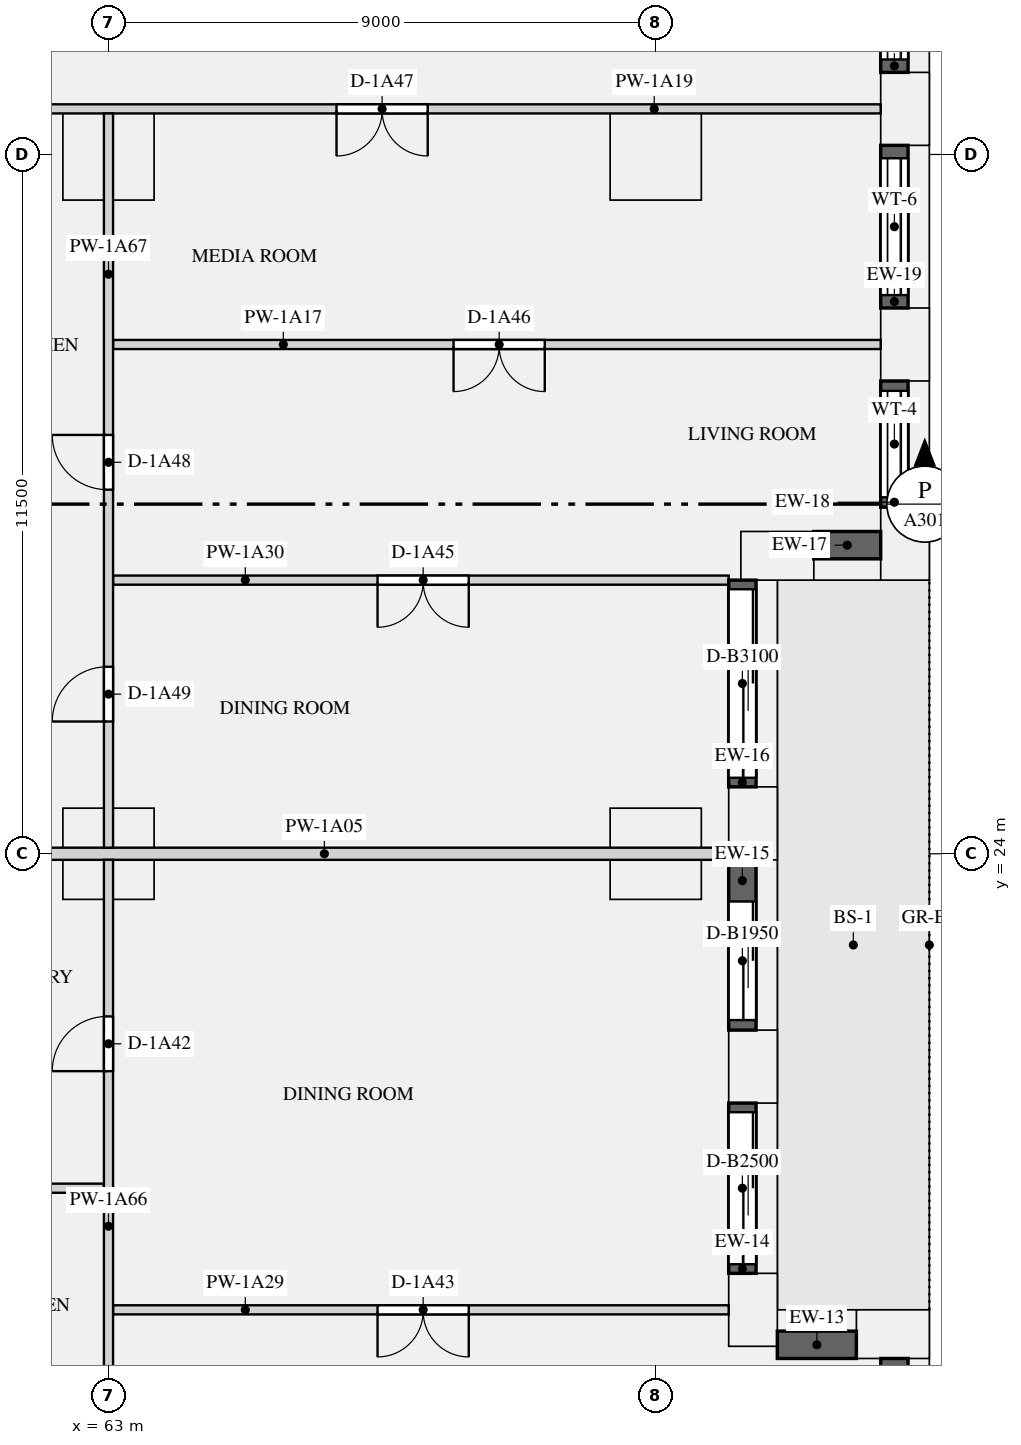
"""IFC4 building model, lengths in metres.
Left out: names, types, materials, properties, quantities, classifications, styles, units other than length and angle.
Written with IfcOpenShell. Run it as: python <this file> out.ifc"""

import sys

from ifc_helpers import new_model, si_unit, direction, frame, frame_2d, origin, origin_2d, place, context, subcontext, project, spatial, rectangle, extrude, element, fill, save


model = new_model("IFC4")
c1 = context("Model", 3, precision=1e-05, world=origin(), true_north=direction((0.0, 1.0)))
c2 = subcontext(c1, "Body", "Model", "MODEL_VIEW")
j1 = project(units=[si_unit("LENGTHUNIT", "METRE"), si_unit("PLANEANGLEUNIT", "RADIAN")], contexts=[c1])
p1 = place(None, origin())
s1 = spatial("IfcSite", under=j1, at=p1, CompositionType="ELEMENT")
p2 = place(p1, origin())
s2 = spatial("IfcBuilding", under=s1, at=p2, CompositionType="ELEMENT")
p3 = place(p2, frame((0.0, 0.0, 19.5)))
s3 = spatial("IfcBuildingStorey", under=s2, at=p3, CompositionType="ELEMENT", Elevation=19.5)
for number, where, z_axis, x_axis in (
    (1, (75.9, 16.1, 0.0), (0.0, 0.0, 1.0), (-1.0, 0.0, 0.0)),
    (2, (73.6, 16.5, 0.0), (0.0, 0.0, 1.0), (0.0, 1.0, 0.0)),
):
    element("IfcColumn", number, at=place(p3, frame(where, z_axis=z_axis, x_axis=x_axis)), inside=s3, PredefinedType="USERDEFINED", context=c2, shape_type="SweptSolid", body=[
        extrude(rectangle(XDim=1.2, YDim=0.8, at=origin_2d()), origin(), (0.0, 0.0, 1.0), 3.15),
    ])
for number, where, z_axis, x_axis in (
    (3, (73.6, 20.5, -0.32), (0.0, 0.0, 1.0), (0.0, 1.0, 0.0)),
    (4, (73.6, 24.5, -0.32), (0.0, 0.0, 1.0), (0.0, 1.0, 0.0)),
):
    element("IfcColumn", number, at=place(p3, frame(where, z_axis=z_axis, x_axis=x_axis)), inside=s3, PredefinedType="USERDEFINED", context=c2, shape_type="SweptSolid", body=[
        extrude(rectangle(XDim=1.2, YDim=0.8, at=origin_2d()), origin(), (0.0, 0.0, 1.0), 3.47),
    ])
for number, where, z_axis, x_axis in (
    (5, (74.0, 28.9, 0.0), (0.0, 0.0, 1.0), (1.0, 0.0, 0.0)),
    (6, (76.1, 29.1, 0.0), (0.0, 0.0, 1.0), (0.0, 1.0, 0.0)),
):
    element("IfcColumn", number, at=place(p3, frame(where, z_axis=z_axis, x_axis=x_axis)), inside=s3, PredefinedType="USERDEFINED", context=c2, shape_type="SweptSolid", body=[
        extrude(rectangle(XDim=1.2, YDim=0.8, at=origin_2d()), origin(), (0.0, 0.0, 1.0), 3.15),
    ])
for number, where, z_axis, x_axis in (
    (7, (76.1, 32.375, -0.32), (0.0, 0.0, 1.0), (0.0, 1.0, 0.0)),
    (8, (76.1, 36.25, -0.32), (0.0, 0.0, 1.0), (0.0, 1.0, 0.0)),
):
    element("IfcColumn", number, at=place(p3, frame(where, z_axis=z_axis, x_axis=x_axis)), inside=s3, PredefinedType="USERDEFINED", context=c2, shape_type="SweptSolid", body=[
        extrude(rectangle(XDim=1.2, YDim=0.8, at=origin_2d()), origin(), (0.0, 0.0, 1.0), 3.47),
    ])
for number, where, z_axis, x_axis in (
    (9, (63.0, 24.0, 0.0), (0.0, 0.0, 1.0), (1.0, 0.0, 0.0)),
    (10, (72.0, 24.0, 0.0), (0.0, 0.0, 1.0), (1.0, 0.0, 0.0)),
    (11, (63.0, 35.5, 0.0), (0.0, 0.0, 1.0), (1.0, 0.0, 0.0)),
    (12, (72.0, 35.5, 0.0), (0.0, 0.0, 1.0), (1.0, 0.0, 0.0)),
):
    element("IfcColumn", number, at=place(p3, frame(where, z_axis=z_axis, x_axis=x_axis)), inside=s3, PredefinedType="COLUMN", context=c2, shape_type="SweptSolid", body=[
        extrude(rectangle(XDim=1.5, YDim=1.5, at=origin_2d()), origin(), (0.0, 0.0, 1.0), 3.15),
    ])
p4 = place(p3, frame((75.925, 13.1, 0.9), z_axis=(0.0, 0.0, 1.0), x_axis=(0.0, 1.0, 0.0)))
e13 = element("IfcWall", 13, at=p4, inside=s3, PredefinedType="SOLIDWALL", context=c2, shape_type="SweptSolid", body=[
    extrude(rectangle(XDim=2.6, YDim=0.45, at=frame_2d((1.3, 0.0))), origin(), (0.0, 0.0, 1.0), 1.93),
])
p5 = place(p4, frame((0.175, 0.0, 0.15)))
e14 = element("IfcOpeningElement", 14, at=p5, cuts=e13, PredefinedType="OPENING", context=c2, shape_type="SweptSolid", body=[
    extrude(rectangle(XDim=2.25, YDim=1.5, at=frame_2d((1.125, 0.75))), frame((0.0, 0.235, 0.0), z_axis=(0.0, -1.0, 0.0), x_axis=(1.0, 0.0, 0.0)), (0.0, 0.0, 1.0), 0.47),
])
p6 = place(p3, frame((75.3, 15.925, 0.9), z_axis=(0.0, 0.0, 1.0), x_axis=(-1.0, 0.0, 0.0)))
e15 = element("IfcWall", 15, at=p6, inside=s3, PredefinedType="SOLIDWALL", context=c2, shape_type="SweptSolid", body=[
    extrude(rectangle(XDim=1.3, YDim=0.45, at=frame_2d((0.65, 0.0))), origin(), (0.0, 0.0, 1.0), 1.93),
])
p7 = place(p3, frame((73.425, 17.1, 0.0), z_axis=(0.0, 0.0, 1.0), x_axis=(0.0, 1.0, 0.0)))
e16 = element("IfcWall", 16, at=p7, inside=s3, PredefinedType="SOLIDWALL", context=c2, shape_type="SweptSolid", body=[
    extrude(rectangle(XDim=2.8, YDim=0.45, at=frame_2d((1.4, 0.0))), origin(), (0.0, 0.0, 1.0), 2.83),
])
p8 = place(p7, frame((0.15, 0.0, 0.0)))
e17 = element("IfcOpeningElement", 17, at=p8, cuts=e16, PredefinedType="OPENING", context=c2, shape_type="SweptSolid", body=[
    extrude(rectangle(XDim=2.5, YDim=2.3, at=frame_2d((1.25, 1.15))), frame((0.0, 0.235, 0.0), z_axis=(0.0, -1.0, 0.0), x_axis=(1.0, 0.0, 0.0)), (0.0, 0.0, 1.0), 0.47),
])
p9 = place(p3, frame((73.425, 21.1, 0.0), z_axis=(0.0, 0.0, 1.0), x_axis=(0.0, 1.0, 0.0)))
e18 = element("IfcWall", 18, at=p9, inside=s3, PredefinedType="SOLIDWALL", context=c2, shape_type="SweptSolid", body=[
    extrude(rectangle(XDim=2.8, YDim=0.45, at=frame_2d((1.4, 0.0))), origin(), (0.0, 0.0, 1.0), 2.83),
])
p10 = place(p9, frame((0.165, 0.0, 0.0)))
e19 = element("IfcOpeningElement", 19, at=p10, cuts=e18, PredefinedType="OPENING", context=c2, shape_type="SweptSolid", body=[
    extrude(rectangle(XDim=1.95, YDim=2.3, at=frame_2d((0.975, 1.15))), frame((0.0, 0.235, 0.0), z_axis=(0.0, -1.0, 0.0), x_axis=(1.0, 0.0, 0.0)), (0.0, 0.0, 1.0), 0.47),
])
p11 = place(p3, frame((73.425, 25.1, 0.0), z_axis=(0.0, 0.0, 1.0), x_axis=(0.0, 1.0, 0.0)))
e20 = element("IfcWall", 20, at=p11, inside=s3, PredefinedType="SOLIDWALL", context=c2, shape_type="SweptSolid", body=[
    extrude(rectangle(XDim=3.4, YDim=0.45, at=frame_2d((1.7, 0.0))), origin(), (0.0, 0.0, 1.0), 2.83),
])
p12 = place(p11, frame((0.15, 0.0, 0.0)))
e21 = element("IfcOpeningElement", 21, at=p12, cuts=e20, PredefinedType="OPENING", context=c2, shape_type="SweptSolid", body=[
    extrude(rectangle(XDim=3.1, YDim=2.3, at=frame_2d((1.55, 1.15))), frame((0.0, 0.235, 0.0), z_axis=(0.0, -1.0, 0.0), x_axis=(1.0, 0.0, 0.0)), (0.0, 0.0, 1.0), 0.47),
])
p13 = place(p3, frame((74.6, 29.075, 0.9), z_axis=(0.0, 0.0, 1.0), x_axis=(1.0, 0.0, 0.0)))
e22 = element("IfcWall", 22, at=p13, inside=s3, PredefinedType="SOLIDWALL", context=c2, shape_type="SweptSolid", body=[
    extrude(rectangle(XDim=1.1, YDim=0.45, at=frame_2d((0.55, 0.0))), origin(), (0.0, 0.0, 1.0), 1.93),
])
p14 = place(p3, frame((75.925, 29.7, 0.9), z_axis=(0.0, 0.0, 1.0), x_axis=(0.0, 1.0, 0.0)))
e23 = element("IfcWall", 23, at=p14, inside=s3, PredefinedType="SOLIDWALL", context=c2, shape_type="SweptSolid", body=[
    extrude(rectangle(XDim=2.075, YDim=0.45, at=frame_2d((1.038, 0.0))), origin(), (0.0, 0.0, 1.0), 1.93),
])
p15 = place(p14, frame((0.163, 0.0, 0.15)))
e24 = element("IfcOpeningElement", 24, at=p15, cuts=e23, PredefinedType="OPENING", context=c2, shape_type="SweptSolid", body=[
    extrude(rectangle(XDim=1.75, YDim=1.5, at=frame_2d((0.875, 0.75))), frame((0.0, 0.235, 0.0), z_axis=(0.0, -1.0, 0.0), x_axis=(1.0, 0.0, 0.0)), (0.0, 0.0, 1.0), 0.47),
])
p16 = place(p3, frame((75.925, 32.975, 0.9), z_axis=(0.0, 0.0, 1.0), x_axis=(0.0, 1.0, 0.0)))
e25 = element("IfcWall", 25, at=p16, inside=s3, PredefinedType="SOLIDWALL", context=c2, shape_type="SweptSolid", body=[
    extrude(rectangle(XDim=2.675, YDim=0.45, at=frame_2d((1.337, 0.0))), origin(), (0.0, 0.0, 1.0), 1.93),
])
p17 = place(p16, frame((0.212, 0.0, 0.15)))
e26 = element("IfcOpeningElement", 26, at=p17, cuts=e25, PredefinedType="OPENING", context=c2, shape_type="SweptSolid", body=[
    extrude(rectangle(XDim=2.25, YDim=1.5, at=frame_2d((1.125, 0.75))), frame((0.0, 0.235, 0.0), z_axis=(0.0, -1.0, 0.0), x_axis=(1.0, 0.0, 0.0)), (0.0, 0.0, 1.0), 0.47),
])
p18 = place(p3, frame((75.925, 36.85, 0.9), z_axis=(0.0, 0.0, 1.0), x_axis=(0.0, 1.0, 0.0)))
e27 = element("IfcWall", 27, at=p18, inside=s3, PredefinedType="SOLIDWALL", context=c2, shape_type="SweptSolid", body=[
    extrude(rectangle(XDim=2.675, YDim=0.45, at=frame_2d((1.337, 0.0))), origin(), (0.0, 0.0, 1.0), 1.93),
])
p19 = place(p18, frame((0.212, 0.0, 0.15)))
e28 = element("IfcOpeningElement", 28, at=p19, cuts=e27, PredefinedType="OPENING", context=c2, shape_type="SweptSolid", body=[
    extrude(rectangle(XDim=2.25, YDim=1.5, at=frame_2d((1.125, 0.75))), frame((0.0, 0.235, 0.0), z_axis=(0.0, -1.0, 0.0), x_axis=(1.0, 0.0, 0.0)), (0.0, 0.0, 1.0), 0.47),
])
p20 = place(p3, frame((59.9, 24.0, 0.0), z_axis=(0.0, 0.0, 1.0), x_axis=(1.0, 0.0, 0.0)))
e29 = element("IfcWall", 29, at=p20, inside=s3, PredefinedType="PARTITIONING", context=c2, shape_type="SweptSolid", body=[
    extrude(rectangle(XDim=13.3, YDim=0.2, at=frame_2d((6.65, 0.0))), origin(), (0.0, 0.0, 1.0), 2.83),
])
p21 = place(p3, frame((63.075, 32.375, 0.0), z_axis=(0.0, 0.0, 1.0), x_axis=(1.0, 0.0, 0.0)))
e30 = element("IfcWall", 30, at=p21, inside=s3, PredefinedType="PARTITIONING", context=c2, shape_type="SweptSolid", body=[
    extrude(rectangle(XDim=12.625, YDim=0.15, at=frame_2d((6.312, 0.0))), origin(), (0.0, 0.0, 1.0), 2.83),
])
p22 = place(p21, frame((5.6, 0.0, 0.0)))
e31 = element("IfcOpeningElement", 31, at=p22, cuts=e30, PredefinedType="OPENING", context=c2, shape_type="SweptSolid", body=[
    extrude(rectangle(XDim=1.5, YDim=2.1, at=frame_2d((0.75, 1.05))), frame((0.0, 0.085, 0.0), z_axis=(0.0, -1.0, 0.0), x_axis=(1.0, 0.0, 0.0)), (0.0, 0.0, 1.0), 0.17),
])
p23 = place(p3, frame((59.725, 36.25, 0.0), z_axis=(0.0, 0.0, 1.0), x_axis=(1.0, 0.0, 0.0)))
e32 = element("IfcWall", 32, at=p23, inside=s3, PredefinedType="PARTITIONING", context=c2, shape_type="SweptSolid", body=[
    extrude(rectangle(XDim=15.975, YDim=0.15, at=frame_2d((7.987, 0.0))), origin(), (0.0, 0.0, 1.0), 2.83),
])
p24 = place(p23, frame((7.025, 0.0, 0.0)))
e33 = element("IfcOpeningElement", 33, at=p24, cuts=e32, PredefinedType="OPENING", context=c2, shape_type="SweptSolid", body=[
    extrude(rectangle(XDim=1.5, YDim=2.1, at=frame_2d((0.75, 1.05))), frame((0.0, 0.085, 0.0), z_axis=(0.0, -1.0, 0.0), x_axis=(1.0, 0.0, 0.0)), (0.0, 0.0, 1.0), 0.17),
])
p25 = place(p23, frame((0.85, 0.0, 0.0)))
e34 = element("IfcOpeningElement", 34, at=p25, cuts=e32, PredefinedType="OPENING", context=c2, shape_type="SweptSolid", body=[
    extrude(rectangle(XDim=0.9, YDim=2.1, at=frame_2d((0.45, 1.05))), frame((0.0, 0.085, 0.0), z_axis=(0.0, -1.0, 0.0), x_axis=(1.0, 0.0, 0.0)), (0.0, 0.0, 1.0), 0.17),
])
p26 = place(p3, frame((58.575, 18.5, 0.0), z_axis=(0.0, 0.0, 1.0), x_axis=(1.0, 0.0, 0.0)))
e35 = element("IfcWall", 35, at=p26, inside=s3, PredefinedType="PARTITIONING", context=c2, shape_type="SweptSolid", body=[
    extrude(rectangle(XDim=4.35, YDim=0.15, at=frame_2d((2.175, 0.0))), origin(), (0.0, 0.0, 1.0), 2.83),
])
p27 = place(p26, frame((1.725, 0.0, 0.0)))
e36 = element("IfcOpeningElement", 36, at=p27, cuts=e35, PredefinedType="OPENING", context=c2, shape_type="SweptSolid", body=[
    extrude(rectangle(XDim=0.9, YDim=2.1, at=frame_2d((0.45, 1.05))), frame((0.0, 0.085, 0.0), z_axis=(0.0, -1.0, 0.0), x_axis=(1.0, 0.0, 0.0)), (0.0, 0.0, 1.0), 0.17),
])
p28 = place(p3, frame((63.075, 16.5, 0.0), z_axis=(0.0, 0.0, 1.0), x_axis=(1.0, 0.0, 0.0)))
e37 = element("IfcWall", 37, at=p28, inside=s3, PredefinedType="PARTITIONING", context=c2, shape_type="SweptSolid", body=[
    extrude(rectangle(XDim=10.125, YDim=0.15, at=frame_2d((5.062, 0.0))), origin(), (0.0, 0.0, 1.0), 2.83),
])
p29 = place(p28, frame((4.35, 0.0, 0.0)))
e38 = element("IfcOpeningElement", 38, at=p29, cuts=e37, PredefinedType="OPENING", context=c2, shape_type="SweptSolid", body=[
    extrude(rectangle(XDim=1.5, YDim=2.1, at=frame_2d((0.75, 1.05))), frame((0.0, 0.085, 0.0), z_axis=(0.0, -1.0, 0.0), x_axis=(1.0, 0.0, 0.0)), (0.0, 0.0, 1.0), 0.17),
])
p30 = place(p3, frame((63.075, 28.5, 0.0), z_axis=(0.0, 0.0, 1.0), x_axis=(1.0, 0.0, 0.0)))
e39 = element("IfcWall", 39, at=p30, inside=s3, PredefinedType="PARTITIONING", context=c2, shape_type="SweptSolid", body=[
    extrude(rectangle(XDim=10.125, YDim=0.15, at=frame_2d((5.062, 0.0))), origin(), (0.0, 0.0, 1.0), 2.83),
])
p31 = place(p30, frame((4.35, 0.0, 0.0)))
e40 = element("IfcOpeningElement", 40, at=p31, cuts=e39, PredefinedType="OPENING", context=c2, shape_type="SweptSolid", body=[
    extrude(rectangle(XDim=1.5, YDim=2.1, at=frame_2d((0.75, 1.05))), frame((0.0, 0.085, 0.0), z_axis=(0.0, -1.0, 0.0), x_axis=(1.0, 0.0, 0.0)), (0.0, 0.0, 1.0), 0.17),
])
p32 = place(p3, frame((63.0, 12.575, 0.0), z_axis=(0.0, 0.0, 1.0), x_axis=(0.0, 1.0, 0.0)))
e41 = element("IfcWall", 41, at=p32, inside=s3, PredefinedType="PARTITIONING", context=c2, shape_type="SweptSolid", body=[
    extrude(rectangle(XDim=11.325, YDim=0.15, at=frame_2d((5.663, 0.0))), origin(), (0.0, 0.0, 1.0), 2.83),
])
p33 = place(p32, frame((1.85, 0.0, 0.0)))
e42 = element("IfcOpeningElement", 42, at=p33, cuts=e41, PredefinedType="OPENING", context=c2, shape_type="SweptSolid", body=[
    extrude(rectangle(XDim=0.9, YDim=2.1, at=frame_2d((0.45, 1.05))), frame((0.0, 0.085, 0.0), z_axis=(0.0, -1.0, 0.0), x_axis=(1.0, 0.0, 0.0)), (0.0, 0.0, 1.0), 0.17),
])
p34 = place(p32, frame((7.85, 0.0, 0.0)))
e43 = element("IfcOpeningElement", 43, at=p34, cuts=e41, PredefinedType="OPENING", context=c2, shape_type="SweptSolid", body=[
    extrude(rectangle(XDim=0.9, YDim=2.1, at=frame_2d((0.45, 1.05))), frame((0.0, 0.085, 0.0), z_axis=(0.0, -1.0, 0.0), x_axis=(1.0, 0.0, 0.0)), (0.0, 0.0, 1.0), 0.17),
])
p35 = place(p3, frame((63.0, 24.1, 0.0), z_axis=(0.0, 0.0, 1.0), x_axis=(0.0, 1.0, 0.0)))
e44 = element("IfcWall", 44, at=p35, inside=s3, PredefinedType="PARTITIONING", context=c2, shape_type="SweptSolid", body=[
    extrude(rectangle(XDim=12.075, YDim=0.15, at=frame_2d((6.038, 0.0))), origin(), (0.0, 0.0, 1.0), 2.83),
])
p36 = place(p35, frame((5.888, 0.0, 0.0)))
e45 = element("IfcOpeningElement", 45, at=p36, cuts=e44, PredefinedType="OPENING", context=c2, shape_type="SweptSolid", body=[
    extrude(rectangle(XDim=0.9, YDim=2.1, at=frame_2d((0.45, 1.05))), frame((0.0, 0.085, 0.0), z_axis=(0.0, -1.0, 0.0), x_axis=(1.0, 0.0, 0.0)), (0.0, 0.0, 1.0), 0.17),
])
p37 = place(p35, frame((2.075, 0.0, 0.0)))
e46 = element("IfcOpeningElement", 46, at=p37, cuts=e44, PredefinedType="OPENING", context=c2, shape_type="SweptSolid", body=[
    extrude(rectangle(XDim=0.9, YDim=2.1, at=frame_2d((0.45, 1.05))), frame((0.0, 0.085, 0.0), z_axis=(0.0, -1.0, 0.0), x_axis=(1.0, 0.0, 0.0)), (0.0, 0.0, 1.0), 0.17),
])
p38 = place(p8, origin())
e47 = element("IfcDoor", 47, at=p38, inside=s3, OperationType="SLIDING_TO_LEFT", PredefinedType="DOOR", context=c2, shape_type="SweptSolid", body=[
    extrude(rectangle(XDim=2.5, YDim=2.3, at=frame_2d((1.25, 1.15))), frame((0.0, -0.07, 0.0), z_axis=(0.0, -1.0, 0.0), x_axis=(1.0, 0.0, 0.0)), (0.0, 0.0, 1.0), 0.05),
])
fill(e17, e47)
p39 = place(p10, origin())
e48 = element("IfcDoor", 48, at=p39, inside=s3, OperationType="SLIDING_TO_LEFT", PredefinedType="DOOR", context=c2, shape_type="SweptSolid", body=[
    extrude(rectangle(XDim=1.95, YDim=2.3, at=frame_2d((0.975, 1.15))), frame((0.0, -0.07, 0.0), z_axis=(0.0, -1.0, 0.0), x_axis=(1.0, 0.0, 0.0)), (0.0, 0.0, 1.0), 0.05),
])
fill(e19, e48)
p40 = place(p12, origin())
e49 = element("IfcDoor", 49, at=p40, inside=s3, OperationType="SLIDING_TO_LEFT", PredefinedType="DOOR", context=c2, shape_type="SweptSolid", body=[
    extrude(rectangle(XDim=3.1, YDim=2.3, at=frame_2d((1.55, 1.15))), frame((0.0, -0.07, 0.0), z_axis=(0.0, -1.0, 0.0), x_axis=(1.0, 0.0, 0.0)), (0.0, 0.0, 1.0), 0.05),
])
fill(e21, e49)
p41 = place(p15, origin())
e50 = element("IfcWindow", 50, at=p41, inside=s3, PartitioningType="SINGLE_PANEL", PredefinedType="WINDOW", context=c2, shape_type="SweptSolid", body=[
    extrude(rectangle(XDim=1.75, YDim=1.5, at=frame_2d((0.875, 0.75))), frame((0.0, -0.065, 0.0), z_axis=(0.0, -1.0, 0.0), x_axis=(1.0, 0.0, 0.0)), (0.0, 0.0, 1.0), 0.06),
])
fill(e24, e50)
p42 = place(p17, origin())
e51 = element("IfcWindow", 51, at=p42, inside=s3, PartitioningType="SINGLE_PANEL", PredefinedType="WINDOW", context=c2, shape_type="SweptSolid", body=[
    extrude(rectangle(XDim=2.25, YDim=1.5, at=frame_2d((1.125, 0.75))), frame((0.0, -0.065, 0.0), z_axis=(0.0, -1.0, 0.0), x_axis=(1.0, 0.0, 0.0)), (0.0, 0.0, 1.0), 0.06),
])
fill(e26, e51)
p43 = place(p19, origin())
e52 = element("IfcWindow", 52, at=p43, inside=s3, PartitioningType="SINGLE_PANEL", PredefinedType="WINDOW", context=c2, shape_type="SweptSolid", body=[
    extrude(rectangle(XDim=2.25, YDim=1.5, at=frame_2d((1.125, 0.75))), frame((0.0, -0.065, 0.0), z_axis=(0.0, -1.0, 0.0), x_axis=(1.0, 0.0, 0.0)), (0.0, 0.0, 1.0), 0.06),
])
fill(e28, e52)
p44 = place(p34, origin())
e53 = element("IfcDoor", 53, at=p44, inside=s3, OperationType="SINGLE_SWING_LEFT", PredefinedType="DOOR", context=c2, shape_type="SweptSolid", body=[
    extrude(rectangle(XDim=0.9, YDim=2.1, at=frame_2d((0.45, 1.05))), frame((0.0, 0.025, 0.0), z_axis=(0.0, -1.0, 0.0), x_axis=(1.0, 0.0, 0.0)), (0.0, 0.0, 1.0), 0.05),
])
fill(e43, e53)
p45 = place(p29, frame((1.5, 0.0, 0.0), z_axis=(0.0, 0.0, 1.0), x_axis=(-1.0, 0.0, 0.0)))
e54 = element("IfcDoor", 54, at=p45, inside=s3, OperationType="DOUBLE_DOOR_SINGLE_SWING", PredefinedType="DOOR", context=c2, shape_type="SweptSolid", body=[
    extrude(rectangle(XDim=1.5, YDim=2.1, at=frame_2d((0.75, 1.05))), frame((0.0, 0.025, 0.0), z_axis=(0.0, -1.0, 0.0), x_axis=(1.0, 0.0, 0.0)), (0.0, 0.0, 1.0), 0.05),
])
fill(e38, e54)
p46 = place(p31, frame((1.5, 0.0, 0.0), z_axis=(0.0, 0.0, 1.0), x_axis=(-1.0, 0.0, 0.0)))
e55 = element("IfcDoor", 55, at=p46, inside=s3, OperationType="DOUBLE_DOOR_SINGLE_SWING", PredefinedType="DOOR", context=c2, shape_type="SweptSolid", body=[
    extrude(rectangle(XDim=1.5, YDim=2.1, at=frame_2d((0.75, 1.05))), frame((0.0, 0.025, 0.0), z_axis=(0.0, -1.0, 0.0), x_axis=(1.0, 0.0, 0.0)), (0.0, 0.0, 1.0), 0.05),
])
fill(e40, e55)
p47 = place(p22, frame((1.5, 0.0, 0.0), z_axis=(0.0, 0.0, 1.0), x_axis=(-1.0, 0.0, 0.0)))
e56 = element("IfcDoor", 56, at=p47, inside=s3, OperationType="DOUBLE_DOOR_SINGLE_SWING", PredefinedType="DOOR", context=c2, shape_type="SweptSolid", body=[
    extrude(rectangle(XDim=1.5, YDim=2.1, at=frame_2d((0.75, 1.05))), frame((0.0, 0.025, 0.0), z_axis=(0.0, -1.0, 0.0), x_axis=(1.0, 0.0, 0.0)), (0.0, 0.0, 1.0), 0.05),
])
fill(e31, e56)
p48 = place(p24, frame((1.5, 0.0, 0.0), z_axis=(0.0, 0.0, 1.0), x_axis=(-1.0, 0.0, 0.0)))
e57 = element("IfcDoor", 57, at=p48, inside=s3, OperationType="DOUBLE_DOOR_SINGLE_SWING", PredefinedType="DOOR", context=c2, shape_type="SweptSolid", body=[
    extrude(rectangle(XDim=1.5, YDim=2.1, at=frame_2d((0.75, 1.05))), frame((0.0, 0.025, 0.0), z_axis=(0.0, -1.0, 0.0), x_axis=(1.0, 0.0, 0.0)), (0.0, 0.0, 1.0), 0.05),
])
fill(e33, e57)
p49 = place(p36, origin())
e58 = element("IfcDoor", 58, at=p49, inside=s3, OperationType="SINGLE_SWING_RIGHT", PredefinedType="DOOR", context=c2, shape_type="SweptSolid", body=[
    extrude(rectangle(XDim=0.9, YDim=2.1, at=frame_2d((0.45, 1.05))), frame((0.0, 0.025, 0.0), z_axis=(0.0, -1.0, 0.0), x_axis=(1.0, 0.0, 0.0)), (0.0, 0.0, 1.0), 0.05),
])
fill(e45, e58)
p50 = place(p37, origin())
e59 = element("IfcDoor", 59, at=p50, inside=s3, OperationType="SINGLE_SWING_LEFT", PredefinedType="DOOR", context=c2, shape_type="SweptSolid", body=[
    extrude(rectangle(XDim=0.9, YDim=2.1, at=frame_2d((0.45, 1.05))), frame((0.0, 0.025, 0.0), z_axis=(0.0, -1.0, 0.0), x_axis=(1.0, 0.0, 0.0)), (0.0, 0.0, 1.0), 0.05),
])
fill(e46, e59)
save(model, sys.argv[1])
